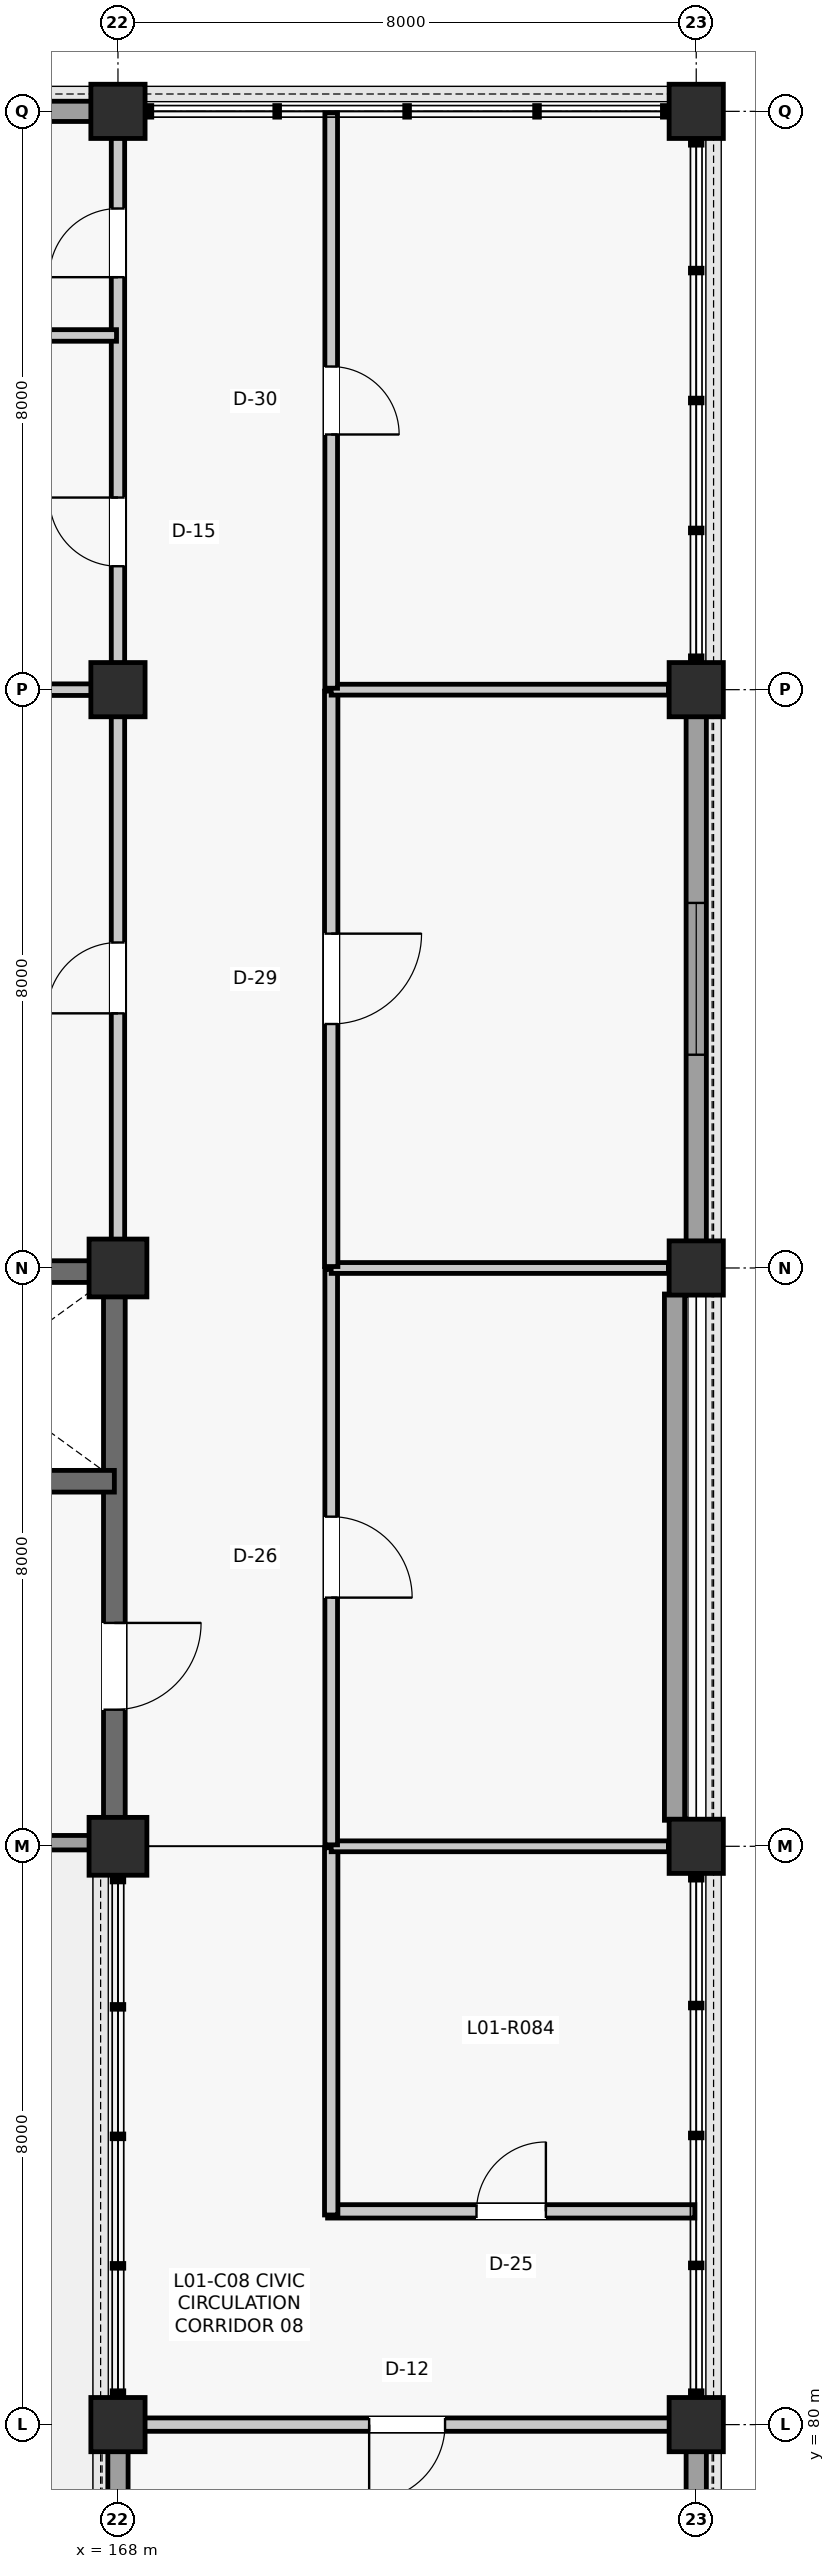
"""IFC4 building model, lengths in metres.
Left out: names, types, materials, properties, quantities, classifications, styles, units other than length and angle.
Written with IfcOpenShell. Run it as: python <this file> out.ifc"""

import sys

from ifc_helpers import new_model, si_unit, direction, frame, frame_2d, origin, origin_2d, place, context, subcontext, project, spatial, rectangle, extrude, element, fill, save


model = new_model("IFC4")
c1 = context("Model", 3, precision=1e-05, world=origin(), true_north=direction((0.0, 1.0)))
c2 = subcontext(c1, "Body", "Model", "MODEL_VIEW")
j1 = project(units=[si_unit("LENGTHUNIT", "METRE"), si_unit("PLANEANGLEUNIT", "RADIAN")], contexts=[c1])
p1 = place(None, origin())
s1 = spatial("IfcSite", under=j1, at=p1, CompositionType="ELEMENT")
p2 = place(p1, origin())
s2 = spatial("IfcBuilding", under=s1, at=p2, CompositionType="ELEMENT")
p3 = place(p2, frame((0.0, 0.0, 5.28)))
s3 = spatial("IfcBuildingStorey", under=s2, at=p3, CompositionType="ELEMENT", Elevation=5.28)
p4 = place(p3, frame((168.0, 80.0, 0.0), z_axis=(0.0, 0.0, 1.0), x_axis=(1.0, 0.0, 0.0)))
e1 = element("IfcColumn", 1, at=p4, inside=s3, PredefinedType="COLUMN", context=c2, shape_type="SweptSolid", body=[
    extrude(rectangle(XDim=0.75, YDim=0.75, at=origin_2d()), origin(), (0.0, 0.0, 1.0), 4.62),
])
for number, where, z_axis, x_axis in (
    (2, (168.0, 88.0, 0.0), (0.0, 0.0, 1.0), (1.0, 0.0, 0.0)),
    (3, (168.0, 96.0, 0.0), (0.0, 0.0, 1.0), (1.0, 0.0, 0.0)),
):
    element("IfcColumn", number, at=place(p3, frame(where, z_axis=z_axis, x_axis=x_axis)), inside=s3, PredefinedType="COLUMN", context=c2, shape_type="SweptSolid", body=[
        extrude(rectangle(XDim=0.8, YDim=0.8, at=origin_2d()), origin(), (0.0, 0.0, 1.0), 4.62),
    ])
for number, where, z_axis, x_axis in (
    (4, (168.0, 104.0, 0.0), (0.0, 0.0, 1.0), (1.0, 0.0, 0.0)),
    (5, (168.0, 112.0, 0.0), (0.0, 0.0, 1.0), (1.0, 0.0, 0.0)),
    (6, (176.0, 80.0, 0.0), (0.0, 0.0, 1.0), (1.0, 0.0, 0.0)),
    (7, (176.0, 88.0, 0.0), (0.0, 0.0, 1.0), (1.0, 0.0, 0.0)),
    (8, (176.0, 96.0, 0.0), (0.0, 0.0, 1.0), (1.0, 0.0, 0.0)),
    (9, (176.0, 104.0, 0.0), (0.0, 0.0, 1.0), (1.0, 0.0, 0.0)),
    (10, (176.0, 112.0, 0.0), (0.0, 0.0, 1.0), (1.0, 0.0, 0.0)),
):
    element("IfcColumn", number, at=place(p3, frame(where, z_axis=z_axis, x_axis=x_axis)), inside=s3, PredefinedType="COLUMN", context=c2, shape_type="SweptSolid", body=[
        extrude(rectangle(XDim=0.75, YDim=0.75, at=origin_2d()), origin(), (0.0, 0.0, 1.0), 4.62),
    ])
p5 = place(p3, frame((160.36, 112.0, 0.0), z_axis=(0.0, 0.0, 1.0), x_axis=(1.0, 0.0, 0.0)))
e11 = element("IfcWall", 11, at=p5, inside=s3, PredefinedType="SOLIDWALL", context=c2, shape_type="SweptSolid", body=[
    extrude(rectangle(XDim=7.28, YDim=0.28, at=frame_2d((3.64, 0.0))), origin(), (0.0, 0.0, 1.0), 3.977),
])
p6 = place(p5, frame((0.835, 0.0, 1.2)))
e12 = element("IfcOpeningElement", 12, at=p6, cuts=e11, PredefinedType="OPENING", context=c2, shape_type="SweptSolid", body=[
    extrude(rectangle(XDim=0.95, YDim=1.4, at=frame_2d((0.475, 0.7))), frame((0.0, 0.15, 0.0), z_axis=(0.0, -1.0, 0.0), x_axis=(1.0, 0.0, 0.0)), (0.0, 0.0, 1.0), 0.3),
])
p7 = place(p5, frame((5.495, 0.0, 1.2)))
e13 = element("IfcOpeningElement", 13, at=p7, cuts=e11, PredefinedType="OPENING", context=c2, shape_type="SweptSolid", body=[
    extrude(rectangle(XDim=0.95, YDim=1.4, at=frame_2d((0.475, 0.7))), frame((0.0, 0.15, 0.0), z_axis=(0.0, -1.0, 0.0), x_axis=(1.0, 0.0, 0.0)), (0.0, 0.0, 1.0), 0.3),
])
p8 = place(p3, frame((168.0, 72.285, 0.0), z_axis=(0.0, 0.0, 1.0), x_axis=(0.0, 1.0, 0.0)))
e14 = element("IfcWall", 14, at=p8, inside=s3, PredefinedType="SOLIDWALL", context=c2, shape_type="SweptSolid", body=[
    extrude(rectangle(XDim=7.355, YDim=0.28, at=frame_2d((3.677, 0.0))), origin(), (0.0, 0.0, 1.0), 3.977),
])
p9 = place(p8, frame((2.778, 0.0, 0.9)))
e15 = element("IfcOpeningElement", 15, at=p9, cuts=e14, PredefinedType="OPENING", context=c2, shape_type="SweptSolid", body=[
    extrude(rectangle(XDim=1.8, YDim=2.3, at=frame_2d((0.9, 1.15))), frame((0.0, 0.15, 0.0), z_axis=(0.0, -1.0, 0.0), x_axis=(1.0, 0.0, 0.0)), (0.0, 0.0, 1.0), 0.3),
])
p10 = place(p3, frame((176.0, 72.285, 0.0), z_axis=(0.0, 0.0, 1.0), x_axis=(0.0, 1.0, 0.0)))
e16 = element("IfcWall", 16, at=p10, inside=s3, PredefinedType="SOLIDWALL", context=c2, shape_type="SweptSolid", body=[
    extrude(rectangle(XDim=7.355, YDim=0.28, at=frame_2d((3.677, 0.0))), origin(), (0.0, 0.0, 1.0), 3.91),
])
p11 = place(p10, frame((2.778, 0.0, 0.9)))
e17 = element("IfcOpeningElement", 17, at=p11, cuts=e16, PredefinedType="OPENING", context=c2, shape_type="SweptSolid", body=[
    extrude(rectangle(XDim=1.8, YDim=2.3, at=frame_2d((0.9, 1.15))), frame((0.0, 0.15, 0.0), z_axis=(0.0, -1.0, 0.0), x_axis=(1.0, 0.0, 0.0)), (0.0, 0.0, 1.0), 0.3),
])
p12 = place(p3, frame((175.7, 88.36, 0.0), z_axis=(0.0, 0.0, 1.0), x_axis=(0.0, 1.0, 0.0)))
e18 = element("IfcWall", 18, at=p12, inside=s3, PredefinedType="SOLIDWALL", context=c2, shape_type="SweptSolid", body=[
    extrude(rectangle(XDim=7.28, YDim=0.28, at=frame_2d((3.64, 0.0))), origin(), (0.0, 0.0, 1.0), 3.914),
])
p13 = place(p3, frame((176.0, 96.36, 0.0), z_axis=(0.0, 0.0, 1.0), x_axis=(0.0, 1.0, 0.0)))
e19 = element("IfcWall", 19, at=p13, inside=s3, PredefinedType="SOLIDWALL", context=c2, shape_type="SweptSolid", body=[
    extrude(rectangle(XDim=7.28, YDim=0.28, at=frame_2d((3.64, 0.0))), origin(), (0.0, 0.0, 1.0), 3.977),
])
p14 = place(p13, frame((2.59, 0.0, 0.9)))
e20 = element("IfcOpeningElement", 20, at=p14, cuts=e19, PredefinedType="OPENING", context=c2, shape_type="SweptSolid", body=[
    extrude(rectangle(XDim=2.1, YDim=2.4, at=frame_2d((1.05, 1.2))), frame((0.0, 0.15, 0.0), z_axis=(0.0, -1.0, 0.0), x_axis=(1.0, 0.0, 0.0)), (0.0, 0.0, 1.0), 0.3),
])
p15 = place(p3, frame((160.29, 95.95, 0.0), z_axis=(0.0, 0.0, 1.0), x_axis=(1.0, 0.0, 0.0)))
e21 = element("IfcWall", 21, at=p15, inside=s3, PredefinedType="SHEAR", context=c2, shape_type="SweptSolid", body=[
    extrude(rectangle(XDim=7.42, YDim=0.3, at=frame_2d((3.71, 0.0))), origin(), (0.0, 0.0, 1.0), 4.335),
])
p16 = place(p3, frame((167.95, 88.29, 0.0), z_axis=(0.0, 0.0, 1.0), x_axis=(0.0, 1.0, 0.0)))
e22 = element("IfcWall", 22, at=p16, inside=s3, PredefinedType="SHEAR", context=c2, shape_type="SweptSolid", body=[
    extrude(rectangle(XDim=7.42, YDim=0.3, at=frame_2d((3.71, 0.0))), origin(), (0.0, 0.0, 1.0), 4.335),
])
p17 = place(p16, frame((1.6, 0.0, 0.0)))
e23 = element("IfcOpeningElement", 23, at=p17, cuts=e22, PredefinedType="OPENING", context=c2, shape_type="SweptSolid", body=[
    extrude(rectangle(XDim=1.2, YDim=2.15, at=frame_2d((0.6, 1.075))), frame((0.0, 0.16, 0.0), z_axis=(0.0, -1.0, 0.0), x_axis=(1.0, 0.0, 0.0)), (0.0, 0.0, 1.0), 0.32),
])
p18 = place(p3, frame((164.0, 93.05, 0.0), z_axis=(0.0, 0.0, 1.0), x_axis=(1.0, 0.0, 0.0)))
e24 = element("IfcWall", 24, at=p18, inside=s3, PredefinedType="SHEAR", context=c2, shape_type="SweptSolid", body=[
    extrude(rectangle(XDim=3.95, YDim=0.3, at=frame_2d((1.975, 0.0))), origin(), (0.0, 0.0, 1.0), 4.335),
])
p19 = place(p18, frame((1.375, 0.0, 0.0)))
e25 = element("IfcOpeningElement", 25, at=p19, cuts=e24, PredefinedType="OPENING", context=c2, shape_type="SweptSolid", body=[
    extrude(rectangle(XDim=1.2, YDim=2.2, at=frame_2d((0.6, 1.1))), frame((0.0, 0.16, 0.0), z_axis=(0.0, -1.0, 0.0), x_axis=(1.0, 0.0, 0.0)), (0.0, 0.0, 1.0), 0.32),
])
p20 = place(p3, frame((164.0, 88.05, 0.0), z_axis=(0.0, 0.0, 1.0), x_axis=(1.0, 0.0, 0.0)))
e26 = element("IfcWall", 26, at=p20, inside=s3, PredefinedType="PARTITIONING", context=c2, shape_type="SweptSolid", body=[
    extrude(rectangle(XDim=3.61, YDim=0.2, at=frame_2d((1.805, 0.0))), origin(), (0.0, 0.0, 1.0), 3.903),
])
p21 = place(p3, frame((170.9, 82.95, 0.0), z_axis=(0.0, 0.0, 1.0), x_axis=(1.0, 0.0, 0.0)))
e27 = element("IfcWall", 27, at=p21, inside=s3, PredefinedType="PARTITIONING", context=c2, shape_type="SweptSolid", body=[
    extrude(rectangle(XDim=5.08, YDim=0.185, at=frame_2d((2.54, 0.0))), origin(), (0.0, 0.0, 1.0), 3.967),
])
p22 = place(p21, frame((2.06, 0.0, 0.0)))
e28 = element("IfcOpeningElement", 28, at=p22, cuts=e27, PredefinedType="OPENING", context=c2, shape_type="SweptSolid", body=[
    extrude(rectangle(XDim=0.96, YDim=2.14, at=frame_2d((0.48, 1.07))), frame((0.0, 0.103, 0.0), z_axis=(0.0, -1.0, 0.0), x_axis=(1.0, 0.0, 0.0)), (0.0, 0.0, 1.0), 0.205),
])
p23 = place(p3, frame((170.95, 82.9, 0.0), z_axis=(0.0, 0.0, 1.0), x_axis=(0.0, 1.0, 0.0)))
e29 = element("IfcWall", 29, at=p23, inside=s3, PredefinedType="PARTITIONING", context=c2, shape_type="SweptSolid", body=[
    extrude(rectangle(XDim=5.08, YDim=0.185, at=frame_2d((2.54, 0.0))), origin(), (0.0, 0.0, 1.0), 3.712),
])
p24 = place(p3, frame((170.95, 88.0, 0.0), z_axis=(0.0, 0.0, 1.0), x_axis=(1.0, 0.0, 0.0)))
e30 = element("IfcWall", 30, at=p24, inside=s3, PredefinedType="PARTITIONING", context=c2, shape_type="SweptSolid", body=[
    extrude(rectangle(XDim=4.665, YDim=0.15, at=frame_2d((2.333, 0.0))), origin(), (0.0, 0.0, 1.0), 3.712),
])
p25 = place(p3, frame((170.95, 88.02, 0.0), z_axis=(0.0, 0.0, 1.0), x_axis=(0.0, 1.0, 0.0)))
e31 = element("IfcWall", 31, at=p25, inside=s3, PredefinedType="PARTITIONING", context=c2, shape_type="SweptSolid", body=[
    extrude(rectangle(XDim=7.96, YDim=0.175, at=frame_2d((3.98, 0.0))), origin(), (0.0, 0.0, 1.0), 3.712),
])
p26 = place(p25, frame((3.42, 0.0, 0.0)))
e32 = element("IfcOpeningElement", 32, at=p26, cuts=e31, PredefinedType="OPENING", context=c2, shape_type="SweptSolid", body=[
    extrude(rectangle(XDim=1.12, YDim=2.22, at=frame_2d((0.56, 1.11))), frame((0.0, 0.097, 0.0), z_axis=(0.0, -1.0, 0.0), x_axis=(1.0, 0.0, 0.0)), (0.0, 0.0, 1.0), 0.195),
])
p27 = place(p3, frame((170.95, 96.0, 0.0), z_axis=(0.0, 0.0, 1.0), x_axis=(1.0, 0.0, 0.0)))
e33 = element("IfcWall", 33, at=p27, inside=s3, PredefinedType="PARTITIONING", context=c2, shape_type="SweptSolid", body=[
    extrude(rectangle(XDim=4.665, YDim=0.15, at=frame_2d((2.333, 0.0))), origin(), (0.0, 0.0, 1.0), 3.787),
])
p28 = place(p3, frame((170.95, 96.02, 0.0), z_axis=(0.0, 0.0, 1.0), x_axis=(0.0, 1.0, 0.0)))
e34 = element("IfcWall", 34, at=p28, inside=s3, PredefinedType="PARTITIONING", context=c2, shape_type="SweptSolid", body=[
    extrude(rectangle(XDim=7.96, YDim=0.185, at=frame_2d((3.98, 0.0))), origin(), (0.0, 0.0, 1.0), 3.771),
])
p29 = place(p28, frame((3.355, 0.0, 0.0)))
e35 = element("IfcOpeningElement", 35, at=p29, cuts=e34, PredefinedType="OPENING", context=c2, shape_type="SweptSolid", body=[
    extrude(rectangle(XDim=1.25, YDim=2.18, at=frame_2d((0.625, 1.09))), frame((0.0, 0.103, 0.0), z_axis=(0.0, -1.0, 0.0), x_axis=(1.0, 0.0, 0.0)), (0.0, 0.0, 1.0), 0.205),
])
p30 = place(p3, frame((170.95, 104.0, 0.0), z_axis=(0.0, 0.0, 1.0), x_axis=(1.0, 0.0, 0.0)))
e36 = element("IfcWall", 36, at=p30, inside=s3, PredefinedType="PARTITIONING", context=c2, shape_type="SweptSolid", body=[
    extrude(rectangle(XDim=4.665, YDim=0.15, at=frame_2d((2.333, 0.0))), origin(), (0.0, 0.0, 1.0), 3.771),
])
p31 = place(p3, frame((170.95, 104.02, 0.0), z_axis=(0.0, 0.0, 1.0), x_axis=(0.0, 1.0, 0.0)))
e37 = element("IfcWall", 37, at=p31, inside=s3, PredefinedType="PARTITIONING", context=c2, shape_type="SweptSolid", body=[
    extrude(rectangle(XDim=7.96, YDim=0.175, at=frame_2d((3.98, 0.0))), origin(), (0.0, 0.0, 1.0), 3.771),
])
p32 = place(p31, frame((3.51, 0.0, 0.0)))
e38 = element("IfcOpeningElement", 38, at=p32, cuts=e37, PredefinedType="OPENING", context=c2, shape_type="SweptSolid", body=[
    extrude(rectangle(XDim=0.94, YDim=2.12, at=frame_2d((0.47, 1.06))), frame((0.0, 0.097, 0.0), z_axis=(0.0, -1.0, 0.0), x_axis=(1.0, 0.0, 0.0)), (0.0, 0.0, 1.0), 0.195),
])
p33 = place(p3, frame((168.0, 96.39, 0.0), z_axis=(0.0, 0.0, 1.0), x_axis=(0.0, 1.0, 0.0)))
e39 = element("IfcWall", 39, at=p33, inside=s3, PredefinedType="PARTITIONING", context=c2, shape_type="SweptSolid", body=[
    extrude(rectangle(XDim=7.245, YDim=0.185, at=frame_2d((3.623, 0.0))), origin(), (0.0, 0.0, 1.0), 3.857),
])
p34 = place(p33, frame((3.133, 0.0, 0.0)))
e40 = element("IfcOpeningElement", 40, at=p34, cuts=e39, PredefinedType="OPENING", context=c2, shape_type="SweptSolid", body=[
    extrude(rectangle(XDim=0.98, YDim=2.15, at=frame_2d((0.49, 1.075))), frame((0.0, 0.103, 0.0), z_axis=(0.0, -1.0, 0.0), x_axis=(1.0, 0.0, 0.0)), (0.0, 0.0, 1.0), 0.205),
])
p35 = place(p3, frame((160.365, 104.0, 0.0), z_axis=(0.0, 0.0, 1.0), x_axis=(1.0, 0.0, 0.0)))
e41 = element("IfcWall", 41, at=p35, inside=s3, PredefinedType="PARTITIONING", context=c2, shape_type="SweptSolid", body=[
    extrude(rectangle(XDim=7.27, YDim=0.16, at=frame_2d((3.635, 0.0))), origin(), (0.0, 0.0, 1.0), 3.787),
])
p36 = place(p3, frame((168.0, 104.365, 0.0), z_axis=(0.0, 0.0, 1.0), x_axis=(0.0, 1.0, 0.0)))
e42 = element("IfcWall", 42, at=p36, inside=s3, PredefinedType="PARTITIONING", context=c2, shape_type="SweptSolid", body=[
    extrude(rectangle(XDim=7.27, YDim=0.185, at=frame_2d((3.635, 0.0))), origin(), (0.0, 0.0, 1.0), 3.781),
])
p37 = place(p36, frame((1.343, 0.0, 0.0)))
e43 = element("IfcOpeningElement", 43, at=p37, cuts=e42, PredefinedType="OPENING", context=c2, shape_type="SweptSolid", body=[
    extrude(rectangle(XDim=0.95, YDim=2.1, at=frame_2d((0.475, 1.05))), frame((0.0, 0.103, 0.0), z_axis=(0.0, -1.0, 0.0), x_axis=(1.0, 0.0, 0.0)), (0.0, 0.0, 1.0), 0.205),
])
p38 = place(p36, frame((5.341, 0.0, 0.0)))
e44 = element("IfcOpeningElement", 44, at=p38, cuts=e42, PredefinedType="OPENING", context=c2, shape_type="SweptSolid", body=[
    extrude(rectangle(XDim=0.95, YDim=2.1, at=frame_2d((0.475, 1.05))), frame((0.0, 0.103, 0.0), z_axis=(0.0, -1.0, 0.0), x_axis=(1.0, 0.0, 0.0)), (0.0, 0.0, 1.0), 0.205),
])
p39 = place(p3, frame((168.365, 80.0, 0.0), z_axis=(0.0, 0.0, 1.0), x_axis=(1.0, 0.0, 0.0)))
e45 = element("IfcWall", 45, at=p39, inside=s3, PredefinedType="PARTITIONING", context=c2, shape_type="SweptSolid", body=[
    extrude(rectangle(XDim=7.27, YDim=0.185, at=frame_2d((3.635, 0.0))), origin(), (0.0, 0.0, 1.0), 3.781),
])
p40 = place(p39, frame((3.11, 0.0, 0.0)))
e46 = element("IfcOpeningElement", 46, at=p40, cuts=e45, PredefinedType="OPENING", context=c2, shape_type="SweptSolid", body=[
    extrude(rectangle(XDim=1.05, YDim=2.15, at=frame_2d((0.525, 1.075))), frame((0.0, 0.103, 0.0), z_axis=(0.0, -1.0, 0.0), x_axis=(1.0, 0.0, 0.0)), (0.0, 0.0, 1.0), 0.205),
])
p41 = place(p3, frame((160.02, 108.9, 0.0), z_axis=(0.0, 0.0, 1.0), x_axis=(1.0, 0.0, 0.0)))
e47 = element("IfcWall", 47, at=p41, inside=s3, PredefinedType="PARTITIONING", context=c2, shape_type="SweptSolid", body=[
    extrude(rectangle(XDim=7.96, YDim=0.16, at=frame_2d((3.98, 0.0))), origin(), (0.0, 0.0, 1.0), 3.781),
])
p42 = place(p14, origin())
e48 = element("IfcWindow", 48, at=p42, inside=s3, PartitioningType="SINGLE_PANEL", PredefinedType="WINDOW", context=c2, shape_type="SweptSolid", body=[
    extrude(rectangle(XDim=2.1, YDim=2.4, at=frame_2d((1.05, 1.2))), frame((0.0, 0.03, 0.0), z_axis=(0.0, -1.0, 0.0), x_axis=(1.0, 0.0, 0.0)), (0.0, 0.0, 1.0), 0.06),
])
fill(e20, e48)
p43 = place(p17, frame((1.2, 0.0, 0.0), z_axis=(0.0, 0.0, 1.0), x_axis=(-1.0, 0.0, 0.0)))
e49 = element("IfcDoor", 49, at=p43, inside=s3, OperationType="SINGLE_SWING_RIGHT", PredefinedType="DOOR", context=c2, shape_type="SweptSolid", body=[
    extrude(rectangle(XDim=1.2, YDim=2.15, at=frame_2d((0.6, 1.075))), frame((0.0, 0.025, 0.0), z_axis=(0.0, -1.0, 0.0), x_axis=(1.0, 0.0, 0.0)), (0.0, 0.0, 1.0), 0.05),
])
fill(e23, e49)
p44 = place(p22, origin())
e50 = element("IfcDoor", 50, at=p44, inside=s3, OperationType="SINGLE_SWING_RIGHT", PredefinedType="DOOR", context=c2, shape_type="SweptSolid", body=[
    extrude(rectangle(XDim=0.96, YDim=2.14, at=frame_2d((0.48, 1.07))), frame((0.0, 0.025, 0.0), z_axis=(0.0, -1.0, 0.0), x_axis=(1.0, 0.0, 0.0)), (0.0, 0.0, 1.0), 0.05),
])
fill(e28, e50)
p45 = place(p26, frame((1.12, 0.0, 0.0), z_axis=(0.0, 0.0, 1.0), x_axis=(-1.0, 0.0, 0.0)))
e51 = element("IfcDoor", 51, at=p45, inside=s3, OperationType="SINGLE_SWING_LEFT", PredefinedType="DOOR", context=c2, shape_type="SweptSolid", body=[
    extrude(rectangle(XDim=1.12, YDim=2.22, at=frame_2d((0.56, 1.11))), frame((0.0, 0.025, 0.0), z_axis=(0.0, -1.0, 0.0), x_axis=(1.0, 0.0, 0.0)), (0.0, 0.0, 1.0), 0.05),
])
fill(e32, e51)
p46 = place(p29, frame((1.25, 0.0, 0.0), z_axis=(0.0, 0.0, 1.0), x_axis=(-1.0, 0.0, 0.0)))
e52 = element("IfcDoor", 52, at=p46, inside=s3, OperationType="SINGLE_SWING_RIGHT", PredefinedType="DOOR", context=c2, shape_type="SweptSolid", body=[
    extrude(rectangle(XDim=1.25, YDim=2.18, at=frame_2d((0.625, 1.09))), frame((0.0, 0.025, 0.0), z_axis=(0.0, -1.0, 0.0), x_axis=(1.0, 0.0, 0.0)), (0.0, 0.0, 1.0), 0.05),
])
fill(e35, e52)
p47 = place(p32, frame((0.94, 0.0, 0.0), z_axis=(0.0, 0.0, 1.0), x_axis=(-1.0, 0.0, 0.0)))
e53 = element("IfcDoor", 53, at=p47, inside=s3, OperationType="SINGLE_SWING_LEFT", PredefinedType="DOOR", context=c2, shape_type="SweptSolid", body=[
    extrude(rectangle(XDim=0.94, YDim=2.12, at=frame_2d((0.47, 1.06))), frame((0.0, 0.025, 0.0), z_axis=(0.0, -1.0, 0.0), x_axis=(1.0, 0.0, 0.0)), (0.0, 0.0, 1.0), 0.05),
])
fill(e38, e53)
p48 = place(p34, origin())
e54 = element("IfcDoor", 54, at=p48, inside=s3, OperationType="SINGLE_SWING_LEFT", PredefinedType="DOOR", context=c2, shape_type="SweptSolid", body=[
    extrude(rectangle(XDim=0.98, YDim=2.15, at=frame_2d((0.49, 1.075))), frame((0.0, 0.025, 0.0), z_axis=(0.0, -1.0, 0.0), x_axis=(1.0, 0.0, 0.0)), (0.0, 0.0, 1.0), 0.05),
])
fill(e40, e54)
p49 = place(p37, origin())
e55 = element("IfcDoor", 55, at=p49, inside=s3, OperationType="SINGLE_SWING_RIGHT", PredefinedType="DOOR", context=c2, shape_type="SweptSolid", body=[
    extrude(rectangle(XDim=0.95, YDim=2.1, at=frame_2d((0.475, 1.05))), frame((0.0, 0.025, 0.0), z_axis=(0.0, -1.0, 0.0), x_axis=(1.0, 0.0, 0.0)), (0.0, 0.0, 1.0), 0.05),
])
fill(e43, e55)
p50 = place(p38, origin())
e56 = element("IfcDoor", 56, at=p50, inside=s3, OperationType="SINGLE_SWING_LEFT", PredefinedType="DOOR", context=c2, shape_type="SweptSolid", body=[
    extrude(rectangle(XDim=0.95, YDim=2.1, at=frame_2d((0.475, 1.05))), frame((0.0, 0.025, 0.0), z_axis=(0.0, -1.0, 0.0), x_axis=(1.0, 0.0, 0.0)), (0.0, 0.0, 1.0), 0.05),
])
fill(e44, e56)
p51 = place(p40, frame((1.05, 0.0, 0.0), z_axis=(0.0, 0.0, 1.0), x_axis=(-1.0, 0.0, 0.0)))
e57 = element("IfcDoor", 57, at=p51, inside=s3, OperationType="SINGLE_SWING_LEFT", PredefinedType="DOOR", context=c2, shape_type="SweptSolid", body=[
    extrude(rectangle(XDim=1.05, YDim=2.15, at=frame_2d((0.525, 1.075))), frame((0.0, 0.025, 0.0), z_axis=(0.0, -1.0, 0.0), x_axis=(1.0, 0.0, 0.0)), (0.0, 0.0, 1.0), 0.05),
])
fill(e46, e57)
save(model, sys.argv[1])
